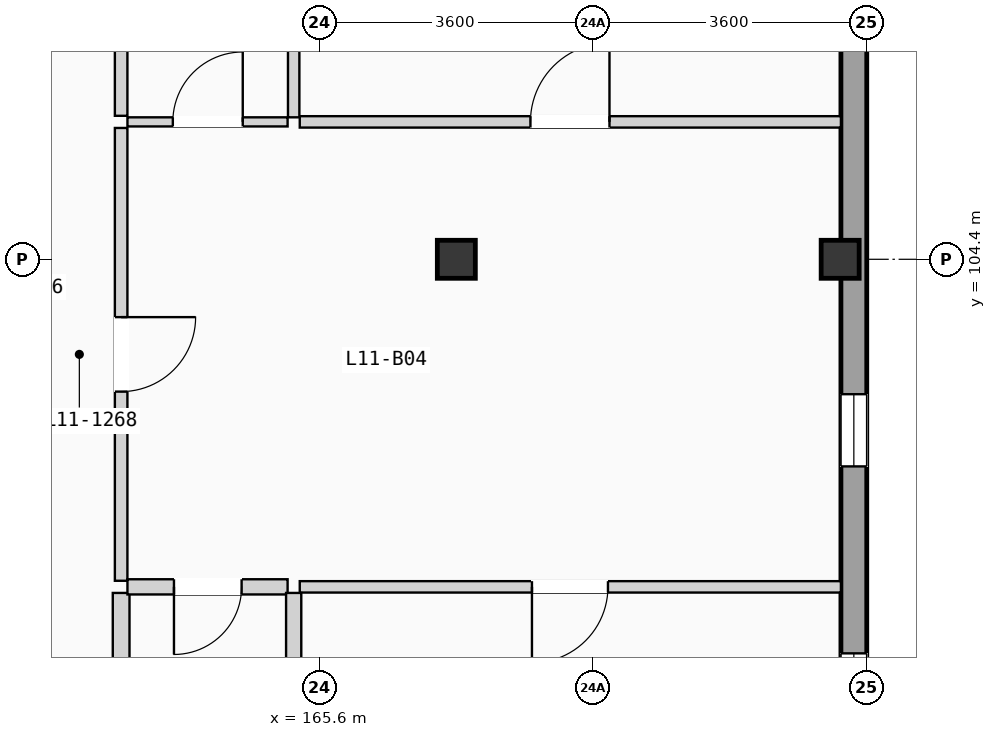
"""IFC4 building model, lengths in metres.
Left out: names, types, materials, properties, quantities, classifications, styles, units other than length and angle.
Written with IfcOpenShell. Run it as: python <this file> out.ifc"""

import sys

from ifc_helpers import new_model, si_unit, direction, frame, frame_2d, origin, origin_2d, place, context, subcontext, project, spatial, rectangle, extrude, element, fill, save


model = new_model("IFC4")
c1 = context("Model", 3, precision=1e-05, world=origin(), true_north=direction((0.0, 1.0)))
c2 = subcontext(c1, "Body", "Model", "MODEL_VIEW")
j1 = project(units=[si_unit("LENGTHUNIT", "METRE"), si_unit("PLANEANGLEUNIT", "RADIAN")], contexts=[c1])
p1 = place(None, origin())
s1 = spatial("IfcSite", under=j1, at=p1, CompositionType="ELEMENT")
p2 = place(p1, origin())
s2 = spatial("IfcBuilding", under=s1, at=p2, CompositionType="ELEMENT")
p3 = place(p2, frame((0.0, 0.0, 37.275)))
s3 = spatial("IfcBuildingStorey", under=s2, at=p3, CompositionType="ELEMENT", Elevation=37.275)
for number, where, z_axis, x_axis in (
    (1, (167.4, 104.4, 0.0), (0.0, 0.0, 1.0), (1.0, 0.0, 0.0)),
    (2, (172.45, 104.4, 0.0), (0.0, 0.0, 1.0), (1.0, 0.0, 0.0)),
):
    element("IfcColumn", number, at=place(p3, frame(where, z_axis=z_axis, x_axis=x_axis)), inside=s3, PredefinedType="COLUMN", context=c2, shape_type="SweptSolid", body=[
        extrude(rectangle(XDim=0.5, YDim=0.5, at=origin_2d()), origin(), (0.0, 0.0, 1.0), 3.15),
    ])
p4 = place(p3, frame((172.63, 68.74, 0.0), z_axis=(0.0, 0.0, 1.0), x_axis=(0.0, 1.0, 0.0)))
e3 = element("IfcWall", 3, at=p4, inside=s3, PredefinedType="SOLIDWALL", context=c2, shape_type="SweptSolid", body=[
    extrude(rectangle(XDim=49.72, YDim=0.34, at=frame_2d((24.86, 0.0))), origin(), (0.0, 0.0, 1.0), 2.6),
])
p5 = place(p4, frame((16.132, 0.0, 0.515)))
e4 = element("IfcOpeningElement", 4, at=p5, cuts=e3, PredefinedType="OPENING", context=c2, shape_type="SweptSolid", body=[
    extrude(rectangle(XDim=2.3, YDim=1.65, at=frame_2d((1.15, 0.825))), frame((0.0, 0.18, 0.0), z_axis=(0.0, -1.0, 0.0), x_axis=(1.0, 0.0, 0.0)), (0.0, 0.0, 1.0), 0.36),
])
p6 = place(p4, frame((9.678, 0.0, 0.85)))
e5 = element("IfcOpeningElement", 5, at=p6, cuts=e3, PredefinedType="OPENING", context=c2, shape_type="SweptSolid", body=[
    extrude(rectangle(XDim=0.95, YDim=1.2, at=frame_2d((0.475, 0.6))), frame((0.0, 0.18, 0.0), z_axis=(0.0, -1.0, 0.0), x_axis=(1.0, 0.0, 0.0)), (0.0, 0.0, 1.0), 0.36),
])
p7 = place(p4, frame((23.379, 0.0, 0.9)))
e6 = element("IfcOpeningElement", 6, at=p7, cuts=e3, PredefinedType="OPENING", context=c2, shape_type="SweptSolid", body=[
    extrude(rectangle(XDim=0.95, YDim=1.2, at=frame_2d((0.475, 0.6))), frame((0.0, 0.18, 0.0), z_axis=(0.0, -1.0, 0.0), x_axis=(1.0, 0.0, 0.0)), (0.0, 0.0, 1.0), 0.36),
])
p8 = place(p4, frame((32.935, 0.0, 0.815)))
e7 = element("IfcOpeningElement", 7, at=p8, cuts=e3, PredefinedType="OPENING", context=c2, shape_type="SweptSolid", body=[
    extrude(rectangle(XDim=0.95, YDim=1.35, at=frame_2d((0.475, 0.675))), frame((0.0, 0.18, 0.0), z_axis=(0.0, -1.0, 0.0), x_axis=(1.0, 0.0, 0.0)), (0.0, 0.0, 1.0), 0.36),
])
p9 = place(p4, frame((29.525, 0.0, 0.665)))
e8 = element("IfcOpeningElement", 8, at=p9, cuts=e3, PredefinedType="OPENING", context=c2, shape_type="SweptSolid", body=[
    extrude(rectangle(XDim=0.95, YDim=1.5, at=frame_2d((0.475, 0.75))), frame((0.0, 0.18, 0.0), z_axis=(0.0, -1.0, 0.0), x_axis=(1.0, 0.0, 0.0)), (0.0, 0.0, 1.0), 0.36),
])
p10 = place(p4, frame((39.529, 0.0, 0.515)))
e9 = element("IfcOpeningElement", 9, at=p10, cuts=e3, PredefinedType="OPENING", context=c2, shape_type="SweptSolid", body=[
    extrude(rectangle(XDim=0.95, YDim=1.65, at=frame_2d((0.475, 0.825))), frame((0.0, 0.18, 0.0), z_axis=(0.0, -1.0, 0.0), x_axis=(1.0, 0.0, 0.0)), (0.0, 0.0, 1.0), 0.36),
])
p11 = place(p3, frame((162.99, 100.17, 0.0), z_axis=(0.0, 0.0, 1.0), x_axis=(0.0, 1.0, 0.0)))
e10 = element("IfcWall", 10, at=p11, inside=s3, PredefinedType="PARTITIONING", context=c2, shape_type="SweptSolid", body=[
    extrude(rectangle(XDim=5.958, YDim=0.165, at=frame_2d((2.979, 0.0))), origin(), (0.0, 0.0, 1.0), 2.87),
])
p12 = place(p11, frame((2.489, 0.0, 0.0)))
e11 = element("IfcOpeningElement", 11, at=p12, cuts=e10, PredefinedType="OPENING", context=c2, shape_type="SweptSolid", body=[
    extrude(rectangle(XDim=0.98, YDim=2.08, at=frame_2d((0.49, 1.04))), frame((0.0, 0.093, 0.0), z_axis=(0.0, -1.0, 0.0), x_axis=(1.0, 0.0, 0.0)), (0.0, 0.0, 1.0), 0.185),
])
p13 = place(p3, frame((162.99, 95.098, 0.0), z_axis=(0.0, 0.0, 1.0), x_axis=(0.0, 1.0, 0.0)))
e12 = element("IfcWall", 12, at=p13, inside=s3, PredefinedType="PLUMBINGWALL", context=c2, shape_type="SweptSolid", body=[
    extrude(rectangle(XDim=4.912, YDim=0.22, at=frame_2d((2.456, 0.0))), origin(), (0.0, 0.0, 1.0), 2.87),
])
p14 = place(p3, frame((162.99, 106.288, 0.0), z_axis=(0.0, 0.0, 1.0), x_axis=(0.0, 1.0, 0.0)))
e13 = element("IfcWall", 13, at=p14, inside=s3, PredefinedType="PARTITIONING", context=c2, shape_type="SweptSolid", body=[
    extrude(rectangle(XDim=4.912, YDim=0.165, at=frame_2d((2.456, 0.0))), origin(), (0.0, 0.0, 1.0), 2.87),
])
p15 = place(p3, frame((163.073, 100.09, 0.0), z_axis=(0.0, 0.0, 1.0), x_axis=(1.0, 0.0, 0.0)))
e14 = element("IfcWall", 14, at=p15, inside=s3, PredefinedType="PLUMBINGWALL", context=c2, shape_type="SweptSolid", body=[
    extrude(rectangle(XDim=2.107, YDim=0.2, at=frame_2d((1.053, 0.0))), origin(), (0.0, 0.0, 1.0), 2.87),
])
p16 = place(p15, frame((0.612, 0.0, 0.0)))
e15 = element("IfcOpeningElement", 15, at=p16, cuts=e14, PredefinedType="OPENING", context=c2, shape_type="SweptSolid", body=[
    extrude(rectangle(XDim=0.89, YDim=2.03, at=frame_2d((0.445, 1.015))), frame((0.0, 0.11, 0.0), z_axis=(0.0, -1.0, 0.0), x_axis=(1.0, 0.0, 0.0)), (0.0, 0.0, 1.0), 0.22),
])
p17 = place(p3, frame((163.073, 106.208, 0.0), z_axis=(0.0, 0.0, 1.0), x_axis=(1.0, 0.0, 0.0)))
e16 = element("IfcWall", 16, at=p17, inside=s3, PredefinedType="PARTITIONING", context=c2, shape_type="SweptSolid", body=[
    extrude(rectangle(XDim=2.107, YDim=0.12, at=frame_2d((1.053, 0.0))), origin(), (0.0, 0.0, 1.0), 2.87),
])
p18 = place(p17, frame((0.597, 0.0, 0.0)))
e17 = element("IfcOpeningElement", 17, at=p18, cuts=e16, PredefinedType="OPENING", context=c2, shape_type="SweptSolid", body=[
    extrude(rectangle(XDim=0.92, YDim=2.02, at=frame_2d((0.46, 1.01))), frame((0.0, 0.07, 0.0), z_axis=(0.0, -1.0, 0.0), x_axis=(1.0, 0.0, 0.0)), (0.0, 0.0, 1.0), 0.14),
])
p19 = place(p3, frame((165.34, 100.09, 0.0), z_axis=(0.0, 0.0, 1.0), x_axis=(1.0, 0.0, 0.0)))
e18 = element("IfcWall", 18, at=p19, inside=s3, PredefinedType="PARTITIONING", context=c2, shape_type="SweptSolid", body=[
    extrude(rectangle(XDim=7.12, YDim=0.15, at=frame_2d((3.56, 0.0))), origin(), (0.0, 0.0, 1.0), 2.87),
])
p20 = place(p19, frame((3.055, 0.0, 0.0)))
e19 = element("IfcOpeningElement", 19, at=p20, cuts=e18, PredefinedType="OPENING", context=c2, shape_type="SweptSolid", body=[
    extrude(rectangle(XDim=1.0, YDim=2.06, at=frame_2d((0.5, 1.03))), frame((0.0, 0.085, 0.0), z_axis=(0.0, -1.0, 0.0), x_axis=(1.0, 0.0, 0.0)), (0.0, 0.0, 1.0), 0.17),
])
p21 = place(p3, frame((165.34, 106.208, 0.0), z_axis=(0.0, 0.0, 1.0), x_axis=(1.0, 0.0, 0.0)))
e20 = element("IfcWall", 20, at=p21, inside=s3, PredefinedType="PARTITIONING", context=c2, shape_type="SweptSolid", body=[
    extrude(rectangle(XDim=7.12, YDim=0.15, at=frame_2d((3.56, 0.0))), origin(), (0.0, 0.0, 1.0), 2.87),
])
p22 = place(p21, frame((3.035, 0.0, 0.0)))
e21 = element("IfcOpeningElement", 21, at=p22, cuts=e20, PredefinedType="OPENING", context=c2, shape_type="SweptSolid", body=[
    extrude(rectangle(XDim=1.04, YDim=2.08, at=frame_2d((0.52, 1.04))), frame((0.0, 0.085, 0.0), z_axis=(0.0, -1.0, 0.0), x_axis=(1.0, 0.0, 0.0)), (0.0, 0.0, 1.0), 0.17),
])
p23 = place(p3, frame((165.26, 95.098, 0.0), z_axis=(0.0, 0.0, 1.0), x_axis=(0.0, 1.0, 0.0)))
e22 = element("IfcWall", 22, at=p23, inside=s3, PredefinedType="PLUMBINGWALL", context=c2, shape_type="SweptSolid", body=[
    extrude(rectangle(XDim=4.912, YDim=0.2, at=frame_2d((2.456, 0.0))), origin(), (0.0, 0.0, 1.0), 2.87),
])
p24 = place(p3, frame((165.26, 106.268, 0.0), z_axis=(0.0, 0.0, 1.0), x_axis=(0.0, 1.0, 0.0)))
e23 = element("IfcWall", 23, at=p24, inside=s3, PredefinedType="PARTITIONING", context=c2, shape_type="SweptSolid", body=[
    extrude(rectangle(XDim=4.932, YDim=0.15, at=frame_2d((2.466, 0.0))), origin(), (0.0, 0.0, 1.0), 2.87),
])
p25 = place(p8, origin())
e24 = element("IfcWindow", 24, at=p25, inside=s3, PartitioningType="SINGLE_PANEL", PredefinedType="WINDOW", context=c2, shape_type="SweptSolid", body=[
    extrude(rectangle(XDim=0.95, YDim=1.35, at=frame_2d((0.475, 0.675))), frame((0.0, 0.03, 0.0), z_axis=(0.0, -1.0, 0.0), x_axis=(1.0, 0.0, 0.0)), (0.0, 0.0, 1.0), 0.06),
])
fill(e7, e24)
p26 = place(p9, origin())
e25 = element("IfcWindow", 25, at=p26, inside=s3, PartitioningType="SINGLE_PANEL", PredefinedType="WINDOW", context=c2, shape_type="SweptSolid", body=[
    extrude(rectangle(XDim=0.95, YDim=1.5, at=frame_2d((0.475, 0.75))), frame((0.0, 0.03, 0.0), z_axis=(0.0, -1.0, 0.0), x_axis=(1.0, 0.0, 0.0)), (0.0, 0.0, 1.0), 0.06),
])
fill(e8, e25)
p27 = place(p12, frame((0.98, 0.0, 0.0), z_axis=(0.0, 0.0, 1.0), x_axis=(-1.0, 0.0, 0.0)))
e26 = element("IfcDoor", 26, at=p27, inside=s3, OperationType="SINGLE_SWING_RIGHT", PredefinedType="DOOR", context=c2, shape_type="SweptSolid", body=[
    extrude(rectangle(XDim=0.98, YDim=2.08, at=frame_2d((0.49, 1.04))), frame((0.0, 0.025, 0.0), z_axis=(0.0, -1.0, 0.0), x_axis=(1.0, 0.0, 0.0)), (0.0, 0.0, 1.0), 0.05),
])
fill(e11, e26)
p28 = place(p16, frame((0.89, 0.0, 0.0), z_axis=(0.0, 0.0, 1.0), x_axis=(-1.0, 0.0, 0.0)))
e27 = element("IfcDoor", 27, at=p28, inside=s3, OperationType="SINGLE_SWING_LEFT", PredefinedType="DOOR", context=c2, shape_type="SweptSolid", body=[
    extrude(rectangle(XDim=0.89, YDim=2.03, at=frame_2d((0.445, 1.015))), frame((0.0, 0.025, 0.0), z_axis=(0.0, -1.0, 0.0), x_axis=(1.0, 0.0, 0.0)), (0.0, 0.0, 1.0), 0.05),
])
fill(e15, e27)
p29 = place(p18, origin())
e28 = element("IfcDoor", 28, at=p29, inside=s3, OperationType="SINGLE_SWING_RIGHT", PredefinedType="DOOR", context=c2, shape_type="SweptSolid", body=[
    extrude(rectangle(XDim=0.92, YDim=2.02, at=frame_2d((0.46, 1.01))), frame((0.0, 0.025, 0.0), z_axis=(0.0, -1.0, 0.0), x_axis=(1.0, 0.0, 0.0)), (0.0, 0.0, 1.0), 0.05),
])
fill(e17, e28)
p30 = place(p20, frame((1.0, 0.0, 0.0), z_axis=(0.0, 0.0, 1.0), x_axis=(-1.0, 0.0, 0.0)))
e29 = element("IfcDoor", 29, at=p30, inside=s3, OperationType="SINGLE_SWING_LEFT", PredefinedType="DOOR", context=c2, shape_type="SweptSolid", body=[
    extrude(rectangle(XDim=1.0, YDim=2.06, at=frame_2d((0.5, 1.03))), frame((0.0, 0.025, 0.0), z_axis=(0.0, -1.0, 0.0), x_axis=(1.0, 0.0, 0.0)), (0.0, 0.0, 1.0), 0.05),
])
fill(e19, e29)
p31 = place(p22, origin())
e30 = element("IfcDoor", 30, at=p31, inside=s3, OperationType="SINGLE_SWING_RIGHT", PredefinedType="DOOR", context=c2, shape_type="SweptSolid", body=[
    extrude(rectangle(XDim=1.04, YDim=2.08, at=frame_2d((0.52, 1.04))), frame((0.0, 0.025, 0.0), z_axis=(0.0, -1.0, 0.0), x_axis=(1.0, 0.0, 0.0)), (0.0, 0.0, 1.0), 0.05),
])
fill(e21, e30)
save(model, sys.argv[1])
